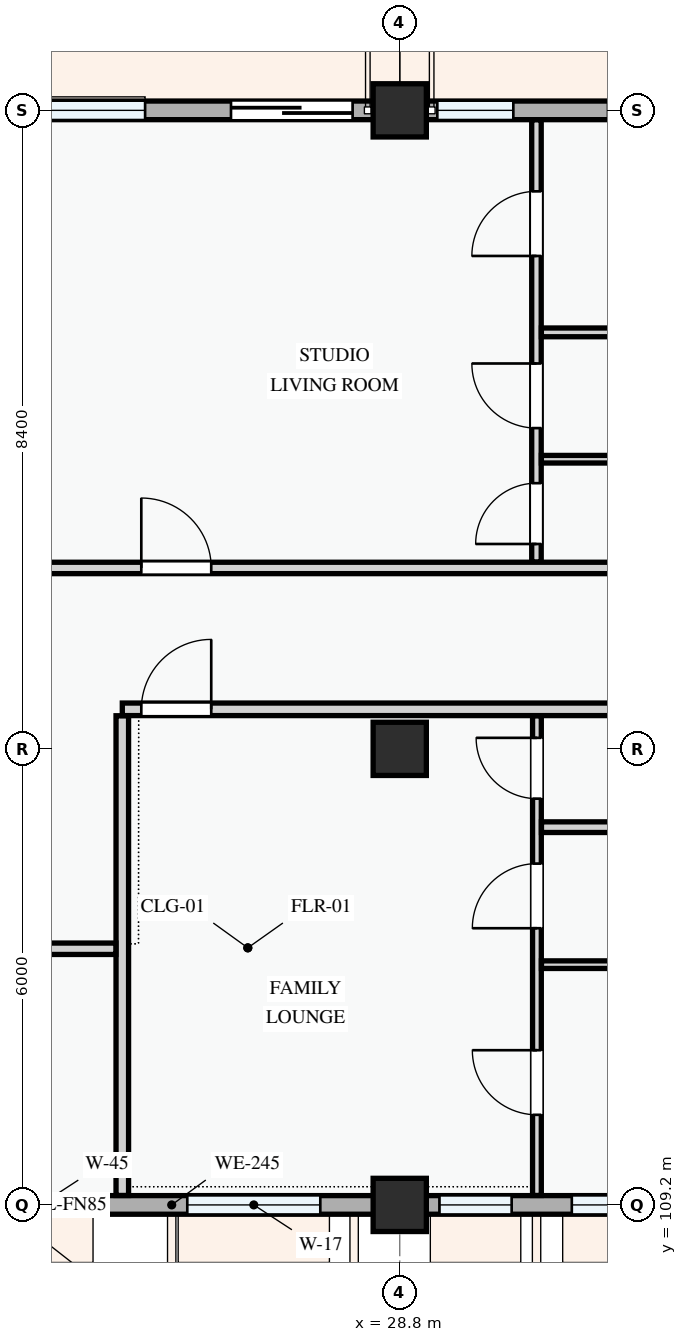
"""IFC4 building model, lengths in metres.
Left out: names, types, materials, properties, quantities, classifications, styles, units other than length and angle.
Written with IfcOpenShell. Run it as: python <this file> out.ifc"""

import sys

from ifc_helpers import new_model, si_unit, direction, frame, frame_2d, origin, origin_2d, place, context, subcontext, project, spatial, rectangle, extrude, element, fill, save


model = new_model("IFC4")
c1 = context("Model", 3, precision=1e-05, world=origin(), true_north=direction((0.0, 1.0)))
c2 = subcontext(c1, "Body", "Model", "MODEL_VIEW")
j1 = project(units=[si_unit("LENGTHUNIT", "METRE"), si_unit("PLANEANGLEUNIT", "RADIAN")], contexts=[c1])
p1 = place(None, origin())
s1 = spatial("IfcSite", under=j1, at=p1, CompositionType="ELEMENT")
p2 = place(p1, origin())
s2 = spatial("IfcBuilding", under=s1, at=p2, CompositionType="ELEMENT")
p3 = place(p2, frame((0.0, 0.0, 8.1)))
s3 = spatial("IfcBuildingStorey", under=s2, at=p3, CompositionType="ELEMENT", Elevation=8.1)
for number, where, z_axis, x_axis in (
    (1, (28.8, 109.2, 0.0), (0.0, 0.0, 1.0), (1.0, 0.0, 0.0)),
    (2, (28.8, 115.2, 0.0), (0.0, 0.0, 1.0), (1.0, 0.0, 0.0)),
    (3, (28.8, 123.6, 0.0), (0.0, 0.0, 1.0), (1.0, 0.0, 0.0)),
):
    element("IfcColumn", number, at=place(p3, frame(where, z_axis=z_axis, x_axis=x_axis)), inside=s3, PredefinedType="COLUMN", context=c2, shape_type="SweptSolid", body=[
        extrude(rectangle(XDim=0.7, YDim=0.7, at=origin_2d()), origin(), (0.0, 0.0, 1.0), 3.3),
    ])
p4 = place(p3, frame((22.8, 109.2, 0.0), z_axis=(0.0, 0.0, 1.0), x_axis=(1.0, 0.0, 0.0)))
e4 = element("IfcWall", 4, at=p4, inside=s3, PredefinedType="STANDARD", context=c2, shape_type="SweptSolid", body=[
    extrude(rectangle(XDim=6.0, YDim=0.245, at=frame_2d((3.0, 0.0))), origin(), (0.0, 0.0, 1.0), 2.475),
])
p5 = place(p4, frame((0.695, 0.0, 0.78)))
e5 = element("IfcOpeningElement", 5, at=p5, cuts=e4, PredefinedType="OPENING", context=c2, shape_type="SweptSolid", body=[
    extrude(rectangle(XDim=1.15, YDim=1.25, at=frame_2d((0.575, 0.625))), frame((0.0, 0.133, 0.0), z_axis=(0.0, -1.0, 0.0), x_axis=(1.0, 0.0, 0.0)), (0.0, 0.0, 1.0), 0.265),
])
p6 = place(p4, frame((3.205, 0.0, 0.78)))
e6 = element("IfcOpeningElement", 6, at=p6, cuts=e4, PredefinedType="OPENING", context=c2, shape_type="SweptSolid", body=[
    extrude(rectangle(XDim=1.75, YDim=1.45, at=frame_2d((0.875, 0.725))), frame((0.0, 0.133, 0.0), z_axis=(0.0, -1.0, 0.0), x_axis=(1.0, 0.0, 0.0)), (0.0, 0.0, 1.0), 0.265),
])
p7 = place(p3, frame((28.8, 109.2, 0.0), z_axis=(0.0, 0.0, 1.0), x_axis=(1.0, 0.0, 0.0)))
e7 = element("IfcWall", 7, at=p7, inside=s3, PredefinedType="STANDARD", context=c2, shape_type="SweptSolid", body=[
    extrude(rectangle(XDim=8.4, YDim=0.245, at=frame_2d((4.2, 0.0))), origin(), (0.0, 0.0, 1.0), 2.375),
])
p8 = place(p7, frame((0.522, 0.0, 0.78)))
e8 = element("IfcOpeningElement", 8, at=p8, cuts=e7, PredefinedType="OPENING", context=c2, shape_type="SweptSolid", body=[
    extrude(rectangle(XDim=0.95, YDim=1.15, at=frame_2d((0.475, 0.575))), frame((0.0, 0.133, 0.0), z_axis=(0.0, -1.0, 0.0), x_axis=(1.0, 0.0, 0.0)), (0.0, 0.0, 1.0), 0.265),
])
p9 = place(p7, frame((2.264, 0.0, 0.78)))
e9 = element("IfcOpeningElement", 9, at=p9, cuts=e7, PredefinedType="OPENING", context=c2, shape_type="SweptSolid", body=[
    extrude(rectangle(XDim=1.58, YDim=1.48, at=frame_2d((0.79, 0.74))), frame((0.0, 0.133, 0.0), z_axis=(0.0, -1.0, 0.0), x_axis=(1.0, 0.0, 0.0)), (0.0, 0.0, 1.0), 0.265),
])
p10 = place(p7, frame((4.911, 0.0, 0.78)))
e10 = element("IfcOpeningElement", 10, at=p10, cuts=e7, PredefinedType="OPENING", context=c2, shape_type="SweptSolid", body=[
    extrude(rectangle(XDim=1.0, YDim=1.25, at=frame_2d((0.5, 0.625))), frame((0.0, 0.133, 0.0), z_axis=(0.0, -1.0, 0.0), x_axis=(1.0, 0.0, 0.0)), (0.0, 0.0, 1.0), 0.265),
])
p11 = place(p7, frame((6.985, 0.0, 0.78)))
e11 = element("IfcOpeningElement", 11, at=p11, cuts=e7, PredefinedType="OPENING", context=c2, shape_type="SweptSolid", body=[
    extrude(rectangle(XDim=0.9, YDim=1.2, at=frame_2d((0.45, 0.6))), frame((0.0, 0.133, 0.0), z_axis=(0.0, -1.0, 0.0), x_axis=(1.0, 0.0, 0.0)), (0.0, 0.0, 1.0), 0.265),
])
p12 = place(p3, frame((37.2, 123.6, 0.0), z_axis=(0.0, 0.0, 1.0), x_axis=(-1.0, 0.0, 0.0)))
e12 = element("IfcWall", 12, at=p12, inside=s3, PredefinedType="STANDARD", context=c2, shape_type="SweptSolid", body=[
    extrude(rectangle(XDim=8.4, YDim=0.245, at=frame_2d((4.2, 0.0))), origin(), (0.0, 0.0, 1.0), 2.345),
])
p13 = place(p12, frame((2.07, 0.0, 0.0)))
e13 = element("IfcOpeningElement", 13, at=p13, cuts=e12, PredefinedType="OPENING", context=c2, shape_type="SweptSolid", body=[
    extrude(rectangle(XDim=1.5, YDim=2.2, at=frame_2d((0.75, 1.1))), frame((0.0, 0.133, 0.0), z_axis=(0.0, -1.0, 0.0), x_axis=(1.0, 0.0, 0.0)), (0.0, 0.0, 1.0), 0.265),
])
p14 = place(p12, frame((0.515, 0.0, 0.78)))
e14 = element("IfcOpeningElement", 14, at=p14, cuts=e12, PredefinedType="OPENING", context=c2, shape_type="SweptSolid", body=[
    extrude(rectangle(XDim=0.9, YDim=1.2, at=frame_2d((0.45, 0.6))), frame((0.0, 0.133, 0.0), z_axis=(0.0, -1.0, 0.0), x_axis=(1.0, 0.0, 0.0)), (0.0, 0.0, 1.0), 0.265),
])
p15 = place(p12, frame((4.561, 0.0, 0.78)))
e15 = element("IfcOpeningElement", 15, at=p15, cuts=e12, PredefinedType="OPENING", context=c2, shape_type="SweptSolid", body=[
    extrude(rectangle(XDim=1.1, YDim=1.3, at=frame_2d((0.55, 0.65))), frame((0.0, 0.133, 0.0), z_axis=(0.0, -1.0, 0.0), x_axis=(1.0, 0.0, 0.0)), (0.0, 0.0, 1.0), 0.265),
])
p16 = place(p12, frame((6.906, 0.0, 0.78)))
e16 = element("IfcOpeningElement", 16, at=p16, cuts=e12, PredefinedType="OPENING", context=c2, shape_type="SweptSolid", body=[
    extrude(rectangle(XDim=1.0, YDim=1.25, at=frame_2d((0.5, 0.625))), frame((0.0, 0.133, 0.0), z_axis=(0.0, -1.0, 0.0), x_axis=(1.0, 0.0, 0.0)), (0.0, 0.0, 1.0), 0.265),
])
p17 = place(p3, frame((28.8, 123.6, 0.0), z_axis=(0.0, 0.0, 1.0), x_axis=(-1.0, 0.0, 0.0)))
e17 = element("IfcWall", 17, at=p17, inside=s3, PredefinedType="STANDARD", context=c2, shape_type="SweptSolid", body=[
    extrude(rectangle(XDim=6.0, YDim=0.245, at=frame_2d((3.0, 0.0))), origin(), (0.0, 0.0, 1.0), 2.445),
])
p18 = place(p17, frame((0.62, 0.0, 0.0)))
e18 = element("IfcOpeningElement", 18, at=p18, cuts=e17, PredefinedType="OPENING", context=c2, shape_type="SweptSolid", body=[
    extrude(rectangle(XDim=1.6, YDim=2.2, at=frame_2d((0.8, 1.1))), frame((0.0, 0.133, 0.0), z_axis=(0.0, -1.0, 0.0), x_axis=(1.0, 0.0, 0.0)), (0.0, 0.0, 1.0), 0.265),
])
p19 = place(p17, frame((3.35, 0.0, 0.78)))
e19 = element("IfcOpeningElement", 19, at=p19, cuts=e17, PredefinedType="OPENING", context=c2, shape_type="SweptSolid", body=[
    extrude(rectangle(XDim=1.38, YDim=1.48, at=frame_2d((0.69, 0.74))), frame((0.0, 0.133, 0.0), z_axis=(0.0, -1.0, 0.0), x_axis=(1.0, 0.0, 0.0)), (0.0, 0.0, 1.0), 0.265),
])
p20 = place(p3, frame((25.15, 109.324, 0.0), z_axis=(0.0, 0.0, 1.0), x_axis=(0.0, 1.0, 0.0)))
e20 = element("IfcWall", 20, at=p20, inside=s3, PredefinedType="PARTITIONING", context=c2, shape_type="SweptSolid", body=[
    extrude(rectangle(XDim=6.311, YDim=0.165, at=frame_2d((3.156, 0.0))), origin(), (0.0, 0.0, 1.0), 3.0),
])
p21 = place(p3, frame((22.66, 112.57, 0.0), z_axis=(0.0, 0.0, 1.0), x_axis=(1.0, 0.0, 0.0)))
e21 = element("IfcWall", 21, at=p21, inside=s3, PredefinedType="PARTITIONING", context=c2, shape_type="SweptSolid", body=[
    extrude(rectangle(XDim=2.406, YDim=0.15, at=frame_2d((1.203, 0.0))), origin(), (0.0, 0.0, 1.0), 3.0),
])
p22 = place(p3, frame((30.605, 109.324, 0.0), z_axis=(0.0, 0.0, 1.0), x_axis=(0.0, 1.0, 0.0)))
e22 = element("IfcWall", 22, at=p22, inside=s3, PredefinedType="PARTITIONING", context=c2, shape_type="SweptSolid", body=[
    extrude(rectangle(XDim=6.311, YDim=0.115, at=frame_2d((3.156, 0.0))), origin(), (0.0, 0.0, 1.0), 3.0),
])
p23 = place(p22, frame((1.061, 0.0, 0.0)))
e23 = element("IfcOpeningElement", 23, at=p23, cuts=e22, PredefinedType="OPENING", context=c2, shape_type="SweptSolid", body=[
    extrude(rectangle(XDim=0.85, YDim=2.1, at=frame_2d((0.425, 1.05))), frame((0.0, 0.067, 0.0), z_axis=(0.0, -1.0, 0.0), x_axis=(1.0, 0.0, 0.0)), (0.0, 0.0, 1.0), 0.135),
])
p24 = place(p22, frame((3.516, 0.0, 0.0)))
e24 = element("IfcOpeningElement", 24, at=p24, cuts=e22, PredefinedType="OPENING", context=c2, shape_type="SweptSolid", body=[
    extrude(rectangle(XDim=0.85, YDim=2.1, at=frame_2d((0.425, 1.05))), frame((0.0, 0.067, 0.0), z_axis=(0.0, -1.0, 0.0), x_axis=(1.0, 0.0, 0.0)), (0.0, 0.0, 1.0), 0.135),
])
p25 = place(p22, frame((5.22, 0.0, 0.0)))
e25 = element("IfcOpeningElement", 25, at=p25, cuts=e22, PredefinedType="OPENING", context=c2, shape_type="SweptSolid", body=[
    extrude(rectangle(XDim=0.8, YDim=2.1, at=frame_2d((0.4, 1.05))), frame((0.0, 0.067, 0.0), z_axis=(0.0, -1.0, 0.0), x_axis=(1.0, 0.0, 0.0)), (0.0, 0.0, 1.0), 0.135),
])
p26 = place(p3, frame((30.665, 112.361, 0.0), z_axis=(0.0, 0.0, 1.0), x_axis=(1.0, 0.0, 0.0)))
e26 = element("IfcWall", 26, at=p26, inside=s3, PredefinedType="PARTITIONING", context=c2, shape_type="SweptSolid", body=[
    extrude(rectangle(XDim=4.693, YDim=0.1, at=frame_2d((2.347, 0.0))), origin(), (0.0, 0.0, 1.0), 3.0),
])
p27 = place(p3, frame((30.665, 114.17, 0.0), z_axis=(0.0, 0.0, 1.0), x_axis=(1.0, 0.0, 0.0)))
e27 = element("IfcWall", 27, at=p27, inside=s3, PredefinedType="PARTITIONING", context=c2, shape_type="SweptSolid", body=[
    extrude(rectangle(XDim=4.693, YDim=0.14, at=frame_2d((2.347, 0.0))), origin(), (0.0, 0.0, 1.0), 3.0),
])
p28 = place(p3, frame((30.599, 117.657, 0.0), z_axis=(0.0, 0.0, 1.0), x_axis=(0.0, 1.0, 0.0)))
e28 = element("IfcWall", 28, at=p28, inside=s3, PredefinedType="PARTITIONING", context=c2, shape_type="SweptSolid", body=[
    extrude(rectangle(XDim=5.819, YDim=0.125, at=frame_2d((2.909, 0.0))), origin(), (0.0, 0.0, 1.0), 3.0),
])
p29 = place(p28, frame((0.238, 0.0, 0.0)))
e29 = element("IfcOpeningElement", 29, at=p29, cuts=e28, PredefinedType="OPENING", context=c2, shape_type="SweptSolid", body=[
    extrude(rectangle(XDim=0.8, YDim=2.1, at=frame_2d((0.4, 1.05))), frame((0.0, 0.073, 0.0), z_axis=(0.0, -1.0, 0.0), x_axis=(1.0, 0.0, 0.0)), (0.0, 0.0, 1.0), 0.145),
])
p30 = place(p28, frame((1.763, 0.0, 0.0)))
e30 = element("IfcOpeningElement", 30, at=p30, cuts=e28, PredefinedType="OPENING", context=c2, shape_type="SweptSolid", body=[
    extrude(rectangle(XDim=0.85, YDim=2.1, at=frame_2d((0.425, 1.05))), frame((0.0, 0.073, 0.0), z_axis=(0.0, -1.0, 0.0), x_axis=(1.0, 0.0, 0.0)), (0.0, 0.0, 1.0), 0.145),
])
p31 = place(p28, frame((4.028, 0.0, 0.0)))
e31 = element("IfcOpeningElement", 31, at=p31, cuts=e28, PredefinedType="OPENING", context=c2, shape_type="SweptSolid", body=[
    extrude(rectangle(XDim=0.85, YDim=2.1, at=frame_2d((0.425, 1.05))), frame((0.0, 0.073, 0.0), z_axis=(0.0, -1.0, 0.0), x_axis=(1.0, 0.0, 0.0)), (0.0, 0.0, 1.0), 0.145),
])
p32 = place(p3, frame((30.663, 120.679, 0.0), z_axis=(0.0, 0.0, 1.0), x_axis=(1.0, 0.0, 0.0)))
e32 = element("IfcWall", 32, at=p32, inside=s3, PredefinedType="PARTITIONING", context=c2, shape_type="SweptSolid", body=[
    extrude(rectangle(XDim=4.685, YDim=0.115, at=frame_2d((2.342, 0.0))), origin(), (0.0, 0.0, 1.0), 3.0),
])
p33 = place(p3, frame((30.663, 119.01, 0.0), z_axis=(0.0, 0.0, 1.0), x_axis=(1.0, 0.0, 0.0)))
e33 = element("IfcWall", 33, at=p33, inside=s3, PredefinedType="PARTITIONING", context=c2, shape_type="SweptSolid", body=[
    extrude(rectangle(XDim=4.685, YDim=0.1, at=frame_2d((2.342, 0.0))), origin(), (0.0, 0.0, 1.0), 3.0),
])
p34 = place(p3, frame((25.15, 115.72, 0.0), z_axis=(0.0, 0.0, 1.0), x_axis=(1.0, 0.0, 0.0)))
e34 = element("IfcWall", 34, at=p34, inside=s3, PredefinedType="PARTITIONING", context=c2, shape_type="SweptSolid", body=[
    extrude(rectangle(XDim=32.326, YDim=0.165, at=frame_2d((16.163, 0.0))), origin(), (0.0, 0.0, 1.0), 3.0),
])
p35 = place(p34, frame((0.25, 0.0, 0.0)))
e35 = element("IfcOpeningElement", 35, at=p35, cuts=e34, PredefinedType="OPENING", context=c2, shape_type="SweptSolid", body=[
    extrude(rectangle(XDim=0.92, YDim=2.1, at=frame_2d((0.46, 1.05))), frame((0.0, 0.093, 0.0), z_axis=(0.0, -1.0, 0.0), x_axis=(1.0, 0.0, 0.0)), (0.0, 0.0, 1.0), 0.185),
])
p36 = place(p34, frame((14.548, 0.0, 0.0)))
e36 = element("IfcOpeningElement", 36, at=p36, cuts=e34, PredefinedType="OPENING", context=c2, shape_type="SweptSolid", body=[
    extrude(rectangle(XDim=0.92, YDim=2.1, at=frame_2d((0.46, 1.05))), frame((0.0, 0.093, 0.0), z_axis=(0.0, -1.0, 0.0), x_axis=(1.0, 0.0, 0.0)), (0.0, 0.0, 1.0), 0.185),
])
p37 = place(p34, frame((22.28, 0.0, 0.0)))
e37 = element("IfcOpeningElement", 37, at=p37, cuts=e34, PredefinedType="OPENING", context=c2, shape_type="SweptSolid", body=[
    extrude(rectangle(XDim=0.92, YDim=2.1, at=frame_2d((0.46, 1.05))), frame((0.0, 0.093, 0.0), z_axis=(0.0, -1.0, 0.0), x_axis=(1.0, 0.0, 0.0)), (0.0, 0.0, 1.0), 0.185),
])
p38 = place(p3, frame((22.66, 117.58, 0.0), z_axis=(0.0, 0.0, 1.0), x_axis=(1.0, 0.0, 0.0)))
e38 = element("IfcWall", 38, at=p38, inside=s3, PredefinedType="PARTITIONING", context=c2, shape_type="SweptSolid", body=[
    extrude(rectangle(XDim=34.816, YDim=0.15, at=frame_2d((17.408, 0.0))), origin(), (0.0, 0.0, 1.0), 3.0),
])
p39 = place(p38, frame((2.74, 0.0, 0.0)))
e39 = element("IfcOpeningElement", 39, at=p39, cuts=e38, PredefinedType="OPENING", context=c2, shape_type="SweptSolid", body=[
    extrude(rectangle(XDim=0.92, YDim=2.1, at=frame_2d((0.46, 1.05))), frame((0.0, 0.085, 0.0), z_axis=(0.0, -1.0, 0.0), x_axis=(1.0, 0.0, 0.0)), (0.0, 0.0, 1.0), 0.17),
])
p40 = place(p38, frame((17.085, 0.0, 0.0)))
e40 = element("IfcOpeningElement", 40, at=p40, cuts=e38, PredefinedType="OPENING", context=c2, shape_type="SweptSolid", body=[
    extrude(rectangle(XDim=0.96, YDim=2.12, at=frame_2d((0.48, 1.06))), frame((0.0, 0.085, 0.0), z_axis=(0.0, -1.0, 0.0), x_axis=(1.0, 0.0, 0.0)), (0.0, 0.0, 1.0), 0.17),
])
p41 = place(p38, frame((24.77, 0.0, 0.0)))
e41 = element("IfcOpeningElement", 41, at=p41, cuts=e38, PredefinedType="OPENING", context=c2, shape_type="SweptSolid", body=[
    extrude(rectangle(XDim=0.92, YDim=2.1, at=frame_2d((0.46, 1.05))), frame((0.0, 0.085, 0.0), z_axis=(0.0, -1.0, 0.0), x_axis=(1.0, 0.0, 0.0)), (0.0, 0.0, 1.0), 0.17),
])
p42 = place(p5, origin())
e42 = element("IfcWindow", 42, at=p42, inside=s3, PartitioningType="SINGLE_PANEL", PredefinedType="WINDOW", context=c2, shape_type="SweptSolid", body=[
    extrude(rectangle(XDim=1.15, YDim=1.25, at=frame_2d((0.575, 0.625))), frame((0.0, 0.03, 0.0), z_axis=(0.0, -1.0, 0.0), x_axis=(1.0, 0.0, 0.0)), (0.0, 0.0, 1.0), 0.06),
])
fill(e5, e42)
p43 = place(p6, origin())
e43 = element("IfcWindow", 43, at=p43, inside=s3, PartitioningType="DOUBLE_PANEL_VERTICAL", PredefinedType="WINDOW", context=c2, shape_type="SweptSolid", body=[
    extrude(rectangle(XDim=1.75, YDim=1.45, at=frame_2d((0.875, 0.725))), frame((0.0, 0.03, 0.0), z_axis=(0.0, -1.0, 0.0), x_axis=(1.0, 0.0, 0.0)), (0.0, 0.0, 1.0), 0.06),
])
fill(e6, e43)
p44 = place(p8, origin())
e44 = element("IfcWindow", 44, at=p44, inside=s3, PartitioningType="SINGLE_PANEL", PredefinedType="WINDOW", context=c2, shape_type="SweptSolid", body=[
    extrude(rectangle(XDim=0.95, YDim=1.15, at=frame_2d((0.475, 0.575))), frame((0.0, 0.03, 0.0), z_axis=(0.0, -1.0, 0.0), x_axis=(1.0, 0.0, 0.0)), (0.0, 0.0, 1.0), 0.06),
])
fill(e8, e44)
p45 = place(p9, origin())
e45 = element("IfcWindow", 45, at=p45, inside=s3, PartitioningType="SINGLE_PANEL", PredefinedType="WINDOW", context=c2, shape_type="SweptSolid", body=[
    extrude(rectangle(XDim=1.58, YDim=1.48, at=frame_2d((0.79, 0.74))), frame((0.0, 0.03, 0.0), z_axis=(0.0, -1.0, 0.0), x_axis=(1.0, 0.0, 0.0)), (0.0, 0.0, 1.0), 0.06),
])
fill(e9, e45)
p46 = place(p16, origin())
e46 = element("IfcWindow", 46, at=p46, inside=s3, PartitioningType="SINGLE_PANEL", PredefinedType="WINDOW", context=c2, shape_type="SweptSolid", body=[
    extrude(rectangle(XDim=1.0, YDim=1.25, at=frame_2d((0.5, 0.625))), frame((0.0, 0.03, 0.0), z_axis=(0.0, -1.0, 0.0), x_axis=(1.0, 0.0, 0.0)), (0.0, 0.0, 1.0), 0.06),
])
fill(e16, e46)
p47 = place(p18, frame((1.6, 0.0, 0.0), z_axis=(0.0, 0.0, 1.0), x_axis=(-1.0, 0.0, 0.0)))
e47 = element("IfcDoor", 47, at=p47, inside=s3, OperationType="SLIDING_TO_LEFT", PredefinedType="DOOR", context=c2, shape_type="SweptSolid", body=[
    extrude(rectangle(XDim=1.6, YDim=2.2, at=frame_2d((0.8, 1.1))), frame((0.0, 0.025, 0.0), z_axis=(0.0, -1.0, 0.0), x_axis=(1.0, 0.0, 0.0)), (0.0, 0.0, 1.0), 0.05),
])
fill(e18, e47)
p48 = place(p19, origin())
e48 = element("IfcWindow", 48, at=p48, inside=s3, PartitioningType="SINGLE_PANEL", PredefinedType="WINDOW", context=c2, shape_type="SweptSolid", body=[
    extrude(rectangle(XDim=1.38, YDim=1.48, at=frame_2d((0.69, 0.74))), frame((0.0, 0.03, 0.0), z_axis=(0.0, -1.0, 0.0), x_axis=(1.0, 0.0, 0.0)), (0.0, 0.0, 1.0), 0.06),
])
fill(e19, e48)
p49 = place(p23, origin())
e49 = element("IfcDoor", 49, at=p49, inside=s3, OperationType="SINGLE_SWING_RIGHT", PredefinedType="DOOR", context=c2, shape_type="SweptSolid", body=[
    extrude(rectangle(XDim=0.85, YDim=2.1, at=frame_2d((0.425, 1.05))), frame((0.0, 0.025, 0.0), z_axis=(0.0, -1.0, 0.0), x_axis=(1.0, 0.0, 0.0)), (0.0, 0.0, 1.0), 0.05),
])
fill(e23, e49)
p50 = place(p24, origin())
e50 = element("IfcDoor", 50, at=p50, inside=s3, OperationType="SINGLE_SWING_LEFT", PredefinedType="DOOR", context=c2, shape_type="SweptSolid", body=[
    extrude(rectangle(XDim=0.85, YDim=2.1, at=frame_2d((0.425, 1.05))), frame((0.0, 0.025, 0.0), z_axis=(0.0, -1.0, 0.0), x_axis=(1.0, 0.0, 0.0)), (0.0, 0.0, 1.0), 0.05),
])
fill(e24, e50)
p51 = place(p25, origin())
e51 = element("IfcDoor", 51, at=p51, inside=s3, OperationType="SINGLE_SWING_RIGHT", PredefinedType="DOOR", context=c2, shape_type="SweptSolid", body=[
    extrude(rectangle(XDim=0.8, YDim=2.1, at=frame_2d((0.4, 1.05))), frame((0.0, 0.025, 0.0), z_axis=(0.0, -1.0, 0.0), x_axis=(1.0, 0.0, 0.0)), (0.0, 0.0, 1.0), 0.05),
])
fill(e25, e51)
p52 = place(p29, origin())
e52 = element("IfcDoor", 52, at=p52, inside=s3, OperationType="SINGLE_SWING_LEFT", PredefinedType="DOOR", context=c2, shape_type="SweptSolid", body=[
    extrude(rectangle(XDim=0.8, YDim=2.1, at=frame_2d((0.4, 1.05))), frame((0.0, 0.025, 0.0), z_axis=(0.0, -1.0, 0.0), x_axis=(1.0, 0.0, 0.0)), (0.0, 0.0, 1.0), 0.05),
])
fill(e29, e52)
p53 = place(p30, origin())
e53 = element("IfcDoor", 53, at=p53, inside=s3, OperationType="SINGLE_SWING_RIGHT", PredefinedType="DOOR", context=c2, shape_type="SweptSolid", body=[
    extrude(rectangle(XDim=0.85, YDim=2.1, at=frame_2d((0.425, 1.05))), frame((0.0, 0.025, 0.0), z_axis=(0.0, -1.0, 0.0), x_axis=(1.0, 0.0, 0.0)), (0.0, 0.0, 1.0), 0.05),
])
fill(e30, e53)
p54 = place(p31, origin())
e54 = element("IfcDoor", 54, at=p54, inside=s3, OperationType="SINGLE_SWING_LEFT", PredefinedType="DOOR", context=c2, shape_type="SweptSolid", body=[
    extrude(rectangle(XDim=0.85, YDim=2.1, at=frame_2d((0.425, 1.05))), frame((0.0, 0.025, 0.0), z_axis=(0.0, -1.0, 0.0), x_axis=(1.0, 0.0, 0.0)), (0.0, 0.0, 1.0), 0.05),
])
fill(e31, e54)
p55 = place(p35, origin())
e55 = element("IfcDoor", 55, at=p55, inside=s3, OperationType="SINGLE_SWING_RIGHT", PredefinedType="DOOR", context=c2, shape_type="SweptSolid", body=[
    extrude(rectangle(XDim=0.92, YDim=2.1, at=frame_2d((0.46, 1.05))), frame((0.0, 0.025, 0.0), z_axis=(0.0, -1.0, 0.0), x_axis=(1.0, 0.0, 0.0)), (0.0, 0.0, 1.0), 0.05),
])
fill(e35, e55)
p56 = place(p39, origin())
e56 = element("IfcDoor", 56, at=p56, inside=s3, OperationType="SINGLE_SWING_LEFT", PredefinedType="DOOR", context=c2, shape_type="SweptSolid", body=[
    extrude(rectangle(XDim=0.92, YDim=2.1, at=frame_2d((0.46, 1.05))), frame((0.0, 0.025, 0.0), z_axis=(0.0, -1.0, 0.0), x_axis=(1.0, 0.0, 0.0)), (0.0, 0.0, 1.0), 0.05),
])
fill(e39, e56)
save(model, sys.argv[1])
